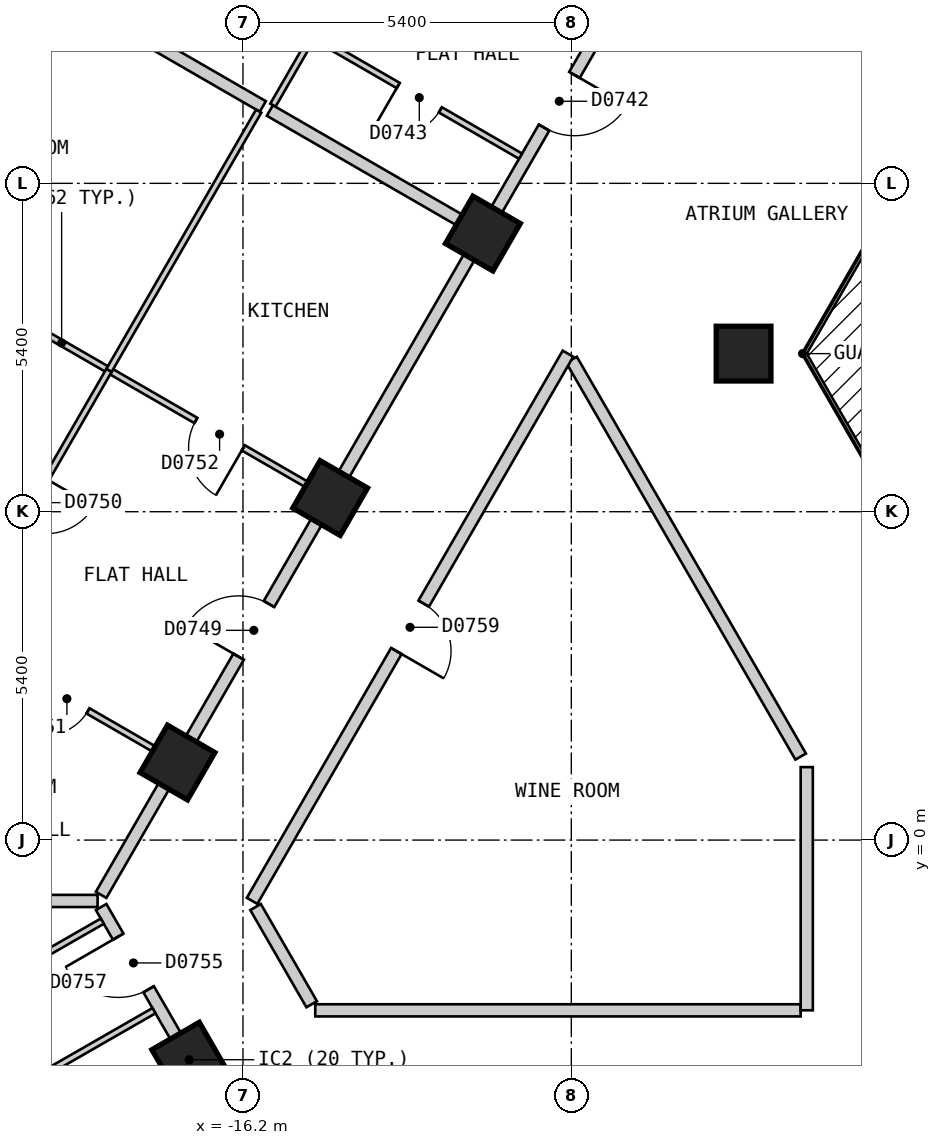
"""IFC4 building model, lengths in metres.
Left out: names, types, materials, properties, quantities, classifications, styles, units other than length and angle.
Written with IfcOpenShell. Run it as: python <this file> out.ifc"""

import sys

from ifc_helpers import new_model, si_unit, direction, frame, frame_2d, origin, origin_2d, place, context, subcontext, project, spatial, polyline, rectangle, outline, extrude, element, fill, save


model = new_model("IFC4")
c1 = context("Model", 3, precision=1e-05, world=origin(), true_north=direction((0.0, 1.0)))
c2 = subcontext(c1, "Body", "Model", "MODEL_VIEW")
j1 = project(units=[si_unit("LENGTHUNIT", "METRE"), si_unit("PLANEANGLEUNIT", "RADIAN")], contexts=[c1])
p1 = place(None, origin())
s1 = spatial("IfcSite", under=j1, at=p1, CompositionType="ELEMENT")
p2 = place(p1, origin())
s2 = spatial("IfcBuilding", under=s1, at=p2, CompositionType="ELEMENT")
p3 = place(p2, frame((0.0, 0.0, 93.0)))
s3 = spatial("IfcBuildingStorey", under=s2, at=p3, CompositionType="ELEMENT", Elevation=93.0)
for number, where, z_axis, x_axis in (
    (1, (-17.083, -3.612, 0.0), (0.0, 0.0, 1.0), (0.5, -0.866, 0.0)),
    (2, (-7.967, 8.0, 0.0), (0.0, 0.0, 1.0), (1.0, 0.0, 0.0)),
    (3, (-12.254, 9.975, 0.0), (0.0, 0.0, 1.0), (-0.5, -0.866, 0.0)),
    (4, (-14.766, 5.625, 0.0), (0.0, 0.0, 1.0), (-0.5, -0.866, 0.0)),
    (5, (-17.277, 1.275, 0.0), (0.0, 0.0, 1.0), (-0.5, -0.866, 0.0)),
):
    element("IfcColumn", number, at=place(p3, frame(where, z_axis=z_axis, x_axis=x_axis)), inside=s3, PredefinedType="COLUMN", context=c2, shape_type="SweptSolid", body=[
        extrude(rectangle(XDim=0.9, YDim=0.9, at=origin_2d()), origin(), (0.0, 0.0, 1.0), 3.0),
    ])
p4 = place(p3, frame((-15.747, 24.425, 0.0), z_axis=(0.0, 0.0, 1.0), x_axis=(-0.500027479704, -0.866009537788, 0.0)))
e6 = element("IfcWall", 6, at=p4, inside=s3, PredefinedType="SOLIDWALL", context=c2, shape_type="SweptSolid", body=[
    extrude(outline(polyline([(0.0, -0.15), (26.559, -0.15), (26.478, 0.15), (0.08, 0.15), (0.0, -0.15)])), origin(), (0.0, 0.0, 1.0), 2.7),
])
p5 = place(p4, frame((1.227, 0.0, 0.15)))
e7 = element("IfcOpeningElement", 7, at=p5, cuts=e6, PredefinedType="OPENING", context=c2, shape_type="SweptSolid", body=[
    extrude(rectangle(XDim=1.5, YDim=2.1, at=frame_2d((0.75, 1.05))), frame((0.0, 0.16, 0.0), z_axis=(0.0, -1.0, 0.0), x_axis=(1.0, 0.0, 0.0)), (0.0, 0.0, 1.0), 0.32),
])
p6 = place(p4, frame((3.739, 0.0, 0.15)))
e8 = element("IfcOpeningElement", 8, at=p6, cuts=e6, PredefinedType="OPENING", context=c2, shape_type="SweptSolid", body=[
    extrude(rectangle(XDim=1.5, YDim=2.1, at=frame_2d((0.75, 1.05))), frame((0.0, 0.16, 0.0), z_axis=(0.0, -1.0, 0.0), x_axis=(1.0, 0.0, 0.0)), (0.0, 0.0, 1.0), 0.32),
])
p7 = place(p4, frame((6.25, 0.0, 0.15)))
e9 = element("IfcOpeningElement", 9, at=p7, cuts=e6, PredefinedType="OPENING", context=c2, shape_type="SweptSolid", body=[
    extrude(rectangle(XDim=1.5, YDim=2.1, at=frame_2d((0.75, 1.05))), frame((0.0, 0.16, 0.0), z_axis=(0.0, -1.0, 0.0), x_axis=(1.0, 0.0, 0.0)), (0.0, 0.0, 1.0), 0.32),
])
p8 = place(p4, frame((8.761, 0.0, 0.15)))
e10 = element("IfcOpeningElement", 10, at=p8, cuts=e6, PredefinedType="OPENING", context=c2, shape_type="SweptSolid", body=[
    extrude(rectangle(XDim=1.5, YDim=2.1, at=frame_2d((0.75, 1.05))), frame((0.0, 0.16, 0.0), z_axis=(0.0, -1.0, 0.0), x_axis=(1.0, 0.0, 0.0)), (0.0, 0.0, 1.0), 0.32),
])
p9 = place(p4, frame((11.273, 0.0, 0.15)))
e11 = element("IfcOpeningElement", 11, at=p9, cuts=e6, PredefinedType="OPENING", context=c2, shape_type="SweptSolid", body=[
    extrude(rectangle(XDim=1.5, YDim=2.1, at=frame_2d((0.75, 1.05))), frame((0.0, 0.16, 0.0), z_axis=(0.0, -1.0, 0.0), x_axis=(1.0, 0.0, 0.0)), (0.0, 0.0, 1.0), 0.32),
])
p10 = place(p4, frame((13.785, 0.0, 0.15)))
e12 = element("IfcOpeningElement", 12, at=p10, cuts=e6, PredefinedType="OPENING", context=c2, shape_type="SweptSolid", body=[
    extrude(rectangle(XDim=1.5, YDim=2.1, at=frame_2d((0.75, 1.05))), frame((0.0, 0.16, 0.0), z_axis=(0.0, -1.0, 0.0), x_axis=(1.0, 0.0, 0.0)), (0.0, 0.0, 1.0), 0.32),
])
p11 = place(p4, frame((16.296, 0.0, 0.15)))
e13 = element("IfcOpeningElement", 13, at=p11, cuts=e6, PredefinedType="OPENING", context=c2, shape_type="SweptSolid", body=[
    extrude(rectangle(XDim=1.5, YDim=2.1, at=frame_2d((0.75, 1.05))), frame((0.0, 0.16, 0.0), z_axis=(0.0, -1.0, 0.0), x_axis=(1.0, 0.0, 0.0)), (0.0, 0.0, 1.0), 0.32),
])
p12 = place(p4, frame((18.807, 0.0, 0.15)))
e14 = element("IfcOpeningElement", 14, at=p12, cuts=e6, PredefinedType="OPENING", context=c2, shape_type="SweptSolid", body=[
    extrude(rectangle(XDim=1.5, YDim=2.1, at=frame_2d((0.75, 1.05))), frame((0.0, 0.16, 0.0), z_axis=(0.0, -1.0, 0.0), x_axis=(1.0, 0.0, 0.0)), (0.0, 0.0, 1.0), 0.32),
])
p13 = place(p4, frame((21.319, 0.0, 0.15)))
e15 = element("IfcOpeningElement", 15, at=p13, cuts=e6, PredefinedType="OPENING", context=c2, shape_type="SweptSolid", body=[
    extrude(rectangle(XDim=1.5, YDim=2.1, at=frame_2d((0.75, 1.05))), frame((0.0, 0.16, 0.0), z_axis=(0.0, -1.0, 0.0), x_axis=(1.0, 0.0, 0.0)), (0.0, 0.0, 1.0), 0.32),
])
p14 = place(p4, frame((23.831, 0.0, 0.15)))
e16 = element("IfcOpeningElement", 16, at=p14, cuts=e6, PredefinedType="OPENING", context=c2, shape_type="SweptSolid", body=[
    extrude(rectangle(XDim=1.5, YDim=2.1, at=frame_2d((0.75, 1.05))), frame((0.0, 0.16, 0.0), z_axis=(0.0, -1.0, 0.0), x_axis=(1.0, 0.0, 0.0)), (0.0, 0.0, 1.0), 0.32),
])
p15 = place(p3, frame((-29.027, -3.425, 0.0), z_axis=(0.0, 0.0, 1.0), x_axis=(0.500035407905, -0.866004960056, 0.0)))
e17 = element("IfcWall", 17, at=p15, inside=s3, PredefinedType="SOLIDWALL", context=c2, shape_type="SweptSolid", body=[
    extrude(outline(polyline([(0.0, -0.15), (23.094, -0.15), (23.014, 0.15), (0.08, 0.15), (0.0, -0.15)])), origin(), (0.0, 0.0, 1.0), 2.7),
])
p16 = place(p15, frame((1.324, 0.0, 0.15)))
e18 = element("IfcOpeningElement", 18, at=p16, cuts=e17, PredefinedType="OPENING", context=c2, shape_type="SweptSolid", body=[
    extrude(rectangle(XDim=1.5, YDim=2.1, at=frame_2d((0.75, 1.05))), frame((0.0, 0.16, 0.0), z_axis=(0.0, -1.0, 0.0), x_axis=(1.0, 0.0, 0.0)), (0.0, 0.0, 1.0), 0.32),
])
p17 = place(p15, frame((4.031, 0.0, 0.15)))
e19 = element("IfcOpeningElement", 19, at=p17, cuts=e17, PredefinedType="OPENING", context=c2, shape_type="SweptSolid", body=[
    extrude(rectangle(XDim=1.5, YDim=2.1, at=frame_2d((0.75, 1.05))), frame((0.0, 0.16, 0.0), z_axis=(0.0, -1.0, 0.0), x_axis=(1.0, 0.0, 0.0)), (0.0, 0.0, 1.0), 0.32),
])
p18 = place(p15, frame((6.737, 0.0, 0.15)))
e20 = element("IfcOpeningElement", 20, at=p18, cuts=e17, PredefinedType="OPENING", context=c2, shape_type="SweptSolid", body=[
    extrude(rectangle(XDim=1.5, YDim=2.1, at=frame_2d((0.75, 1.05))), frame((0.0, 0.16, 0.0), z_axis=(0.0, -1.0, 0.0), x_axis=(1.0, 0.0, 0.0)), (0.0, 0.0, 1.0), 0.32),
])
p19 = place(p15, frame((9.444, 0.0, 0.15)))
e21 = element("IfcOpeningElement", 21, at=p19, cuts=e17, PredefinedType="OPENING", context=c2, shape_type="SweptSolid", body=[
    extrude(rectangle(XDim=1.5, YDim=2.1, at=frame_2d((0.75, 1.05))), frame((0.0, 0.16, 0.0), z_axis=(0.0, -1.0, 0.0), x_axis=(1.0, 0.0, 0.0)), (0.0, 0.0, 1.0), 0.32),
])
p20 = place(p15, frame((12.151, 0.0, 0.15)))
e22 = element("IfcOpeningElement", 22, at=p20, cuts=e17, PredefinedType="OPENING", context=c2, shape_type="SweptSolid", body=[
    extrude(rectangle(XDim=1.5, YDim=2.1, at=frame_2d((0.75, 1.05))), frame((0.0, 0.16, 0.0), z_axis=(0.0, -1.0, 0.0), x_axis=(1.0, 0.0, 0.0)), (0.0, 0.0, 1.0), 0.32),
])
p21 = place(p15, frame((14.857, 0.0, 0.15)))
e23 = element("IfcOpeningElement", 23, at=p21, cuts=e17, PredefinedType="OPENING", context=c2, shape_type="SweptSolid", body=[
    extrude(rectangle(XDim=1.5, YDim=2.1, at=frame_2d((0.75, 1.05))), frame((0.0, 0.16, 0.0), z_axis=(0.0, -1.0, 0.0), x_axis=(1.0, 0.0, 0.0)), (0.0, 0.0, 1.0), 0.32),
])
p22 = place(p15, frame((17.564, 0.0, 0.15)))
e24 = element("IfcOpeningElement", 24, at=p22, cuts=e17, PredefinedType="OPENING", context=c2, shape_type="SweptSolid", body=[
    extrude(rectangle(XDim=1.5, YDim=2.1, at=frame_2d((0.75, 1.05))), frame((0.0, 0.16, 0.0), z_axis=(0.0, -1.0, 0.0), x_axis=(1.0, 0.0, 0.0)), (0.0, 0.0, 1.0), 0.32),
])
p23 = place(p15, frame((20.27, 0.0, 0.15)))
e25 = element("IfcOpeningElement", 25, at=p23, cuts=e17, PredefinedType="OPENING", context=c2, shape_type="SweptSolid", body=[
    extrude(rectangle(XDim=1.5, YDim=2.1, at=frame_2d((0.75, 1.05))), frame((0.0, 0.16, 0.0), z_axis=(0.0, -1.0, 0.0), x_axis=(1.0, 0.0, 0.0)), (0.0, 0.0, 1.0), 0.32),
])
p24 = place(p3, frame((-10.796, 7.899, 0.0), z_axis=(0.0, 0.0, 1.0), x_axis=(0.500010383074, -0.866019409031, 0.0)))
e26 = element("IfcWall", 26, at=p24, inside=s3, PredefinedType="PARTITIONING", context=c2, shape_type="SweptSolid", body=[
    extrude(rectangle(XDim=7.535, YDim=0.2, at=frame_2d((3.768, 0.0))), origin(), (0.0, 0.0, 1.0), 2.7),
])
p25 = place(p3, frame((-15.993, -1.101, 0.0), z_axis=(0.0, 0.0, 1.0), x_axis=(0.499894174133, -0.866086493757, 0.0)))
e27 = element("IfcWall", 27, at=p25, inside=s3, PredefinedType="PARTITIONING", context=c2, shape_type="SweptSolid", body=[
    extrude(rectangle(XDim=1.846, YDim=0.2, at=frame_2d((0.923, 0.0))), origin(), (0.0, 0.0, 1.0), 2.7),
])
p26 = place(p3, frame((-18.533, -1.101, 0.0), z_axis=(0.0, 0.0, 1.0), x_axis=(0.500135180047, -0.865947343479, 0.0)))
e28 = element("IfcWall", 28, at=p26, inside=s3, PredefinedType="PARTITIONING", context=c2, shape_type="SweptSolid", body=[
    extrude(rectangle(XDim=2.799, YDim=0.2, at=frame_2d((1.399, 0.0))), origin(), (0.0, 0.0, 1.0), 2.7),
])
p27 = place(p26, frame((0.562, 0.0, 0.0)))
e29 = element("IfcOpeningElement", 29, at=p27, cuts=e28, PredefinedType="OPENING", context=c2, shape_type="SweptSolid", body=[
    extrude(rectangle(XDim=1.0, YDim=2.1, at=frame_2d((0.5, 1.05))), frame((0.0, 0.11, 0.0), z_axis=(0.0, -1.0, 0.0), x_axis=(1.0, 0.0, 0.0)), (0.0, 0.0, 1.0), 0.22),
])
p28 = place(p3, frame((-15.011, -2.8, 0.0), z_axis=(0.0, 0.0, 1.0), x_axis=(1.0, 0.0, 0.0)))
e30 = element("IfcWall", 30, at=p28, inside=s3, PredefinedType="PARTITIONING", context=c2, shape_type="SweptSolid", body=[
    extrude(rectangle(XDim=7.982, YDim=0.2, at=frame_2d((3.991, 0.0))), origin(), (0.0, 0.0, 1.0), 2.7),
])
p29 = place(p3, frame((-16.05, -1.0, 0.0), z_axis=(0.0, 0.0, 1.0), x_axis=(0.499962449088, 0.866047082728, 0.0)))
e31 = element("IfcWall", 31, at=p29, inside=s3, PredefinedType="PARTITIONING", context=c2, shape_type="SweptSolid", body=[
    extrude(rectangle(XDim=10.391, YDim=0.2, at=frame_2d((5.195, 0.0))), origin(), (0.0, 0.0, 1.0), 2.7),
])
p30 = place(p29, frame((4.745, 0.0, 0.0)))
e32 = element("IfcOpeningElement", 32, at=p30, cuts=e31, PredefinedType="OPENING", context=c2, shape_type="SweptSolid", body=[
    extrude(rectangle(XDim=0.9, YDim=2.1, at=frame_2d((0.45, 1.05))), frame((0.0, 0.11, 0.0), z_axis=(0.0, -1.0, 0.0), x_axis=(1.0, 0.0, 0.0)), (0.0, 0.0, 1.0), 0.22),
])
p31 = place(p3, frame((-18.533, -0.901, 0.0), z_axis=(0.0, 0.0, 1.0), x_axis=(0.499981198768, 0.866036258409, 0.0)))
e33 = element("IfcWall", 33, at=p31, inside=s3, PredefinedType="PARTITIONING", context=c2, shape_type="SweptSolid", body=[
    extrude(rectangle(XDim=20.093, YDim=0.2, at=frame_2d((10.046, 0.0))), origin(), (0.0, 0.0, 1.0), 2.7),
])
p32 = place(p31, frame((14.57, 0.0, 0.0)))
e34 = element("IfcOpeningElement", 34, at=p32, cuts=e33, PredefinedType="OPENING", context=c2, shape_type="SweptSolid", body=[
    extrude(rectangle(XDim=1.0, YDim=2.1, at=frame_2d((0.5, 1.05))), frame((0.0, 0.11, 0.0), z_axis=(0.0, -1.0, 0.0), x_axis=(1.0, 0.0, 0.0)), (0.0, 0.0, 1.0), 0.22),
])
p33 = place(p31, frame((4.523, 0.0, 0.0)))
e35 = element("IfcOpeningElement", 35, at=p33, cuts=e33, PredefinedType="OPENING", context=c2, shape_type="SweptSolid", body=[
    extrude(rectangle(XDim=1.0, YDim=2.1, at=frame_2d((0.5, 1.05))), frame((0.0, 0.11, 0.0), z_axis=(0.0, -1.0, 0.0), x_axis=(1.0, 0.0, 0.0)), (0.0, 0.0, 1.0), 0.22),
])
p34 = place(p3, frame((-6.928, -2.799, 0.0), z_axis=(0.0, 0.0, 1.0), x_axis=(0.0, 1.0, 0.0)))
e36 = element("IfcWall", 36, at=p34, inside=s3, PredefinedType="PARTITIONING", context=c2, shape_type="SweptSolid", body=[
    extrude(rectangle(XDim=3.999, YDim=0.2, at=frame_2d((2.0, 0.0))), origin(), (0.0, 0.0, 1.0), 2.7),
])
p35 = place(p3, frame((-26.025, 6.325, 0.0), z_axis=(0.0, 0.0, 1.0), x_axis=(0.866041268327, -0.499972520799, 0.0)))
e37 = element("IfcWall", 37, at=p35, inside=s3, PredefinedType="PARTITIONING", context=c2, shape_type="SweptSolid", body=[
    extrude(rectangle(XDim=10.0, YDim=0.1, at=frame_2d((5.0, 0.0))), origin(), (0.0, 0.0, 1.0), 2.7),
])
p36 = place(p35, frame((7.601, 0.0, 0.0)))
e38 = element("IfcOpeningElement", 38, at=p36, cuts=e37, PredefinedType="OPENING", context=c2, shape_type="SweptSolid", body=[
    extrude(rectangle(XDim=0.8, YDim=2.1, at=frame_2d((0.4, 1.05))), frame((0.0, 0.06, 0.0), z_axis=(0.0, -1.0, 0.0), x_axis=(1.0, 0.0, 0.0)), (0.0, 0.0, 1.0), 0.12),
])
p37 = place(p35, frame((2.5, 0.0, 0.0)))
e39 = element("IfcOpeningElement", 39, at=p37, cuts=e37, PredefinedType="OPENING", context=c2, shape_type="SweptSolid", body=[
    extrude(rectangle(XDim=0.9, YDim=2.1, at=frame_2d((0.45, 1.05))), frame((0.0, 0.06, 0.0), z_axis=(0.0, -1.0, 0.0), x_axis=(1.0, 0.0, 0.0)), (0.0, 0.0, 1.0), 0.12),
])
p38 = place(p3, frame((-23.513, 10.675, 0.0), z_axis=(0.0, 0.0, 1.0), x_axis=(0.866041268327, -0.499972520799, 0.0)))
e40 = element("IfcWall", 40, at=p38, inside=s3, PredefinedType="PARTITIONING", context=c2, shape_type="SweptSolid", body=[
    extrude(rectangle(XDim=10.0, YDim=0.1, at=frame_2d((5.0, 0.0))), origin(), (0.0, 0.0, 1.0), 2.7),
])
p39 = place(p38, frame((7.55, 0.0, 0.0)))
e41 = element("IfcOpeningElement", 41, at=p39, cuts=e40, PredefinedType="OPENING", context=c2, shape_type="SweptSolid", body=[
    extrude(rectangle(XDim=0.9, YDim=2.1, at=frame_2d((0.45, 1.05))), frame((0.0, 0.06, 0.0), z_axis=(0.0, -1.0, 0.0), x_axis=(1.0, 0.0, 0.0)), (0.0, 0.0, 1.0), 0.12),
])
p40 = place(p38, frame((2.5, 0.0, 0.0)))
e42 = element("IfcOpeningElement", 42, at=p40, cuts=e40, PredefinedType="OPENING", context=c2, shape_type="SweptSolid", body=[
    extrude(rectangle(XDim=0.9, YDim=2.1, at=frame_2d((0.45, 1.05))), frame((0.0, 0.06, 0.0), z_axis=(0.0, -1.0, 0.0), x_axis=(1.0, 0.0, 0.0)), (0.0, 0.0, 1.0), 0.12),
])
p41 = place(p3, frame((-15.009, 13.196, 0.0), z_axis=(0.0, 0.0, 1.0), x_axis=(0.865916335424, -0.500188864377, 0.0)))
e43 = element("IfcWall", 43, at=p41, inside=s3, PredefinedType="PARTITIONING", context=c2, shape_type="SweptSolid", body=[
    extrude(rectangle(XDim=3.896, YDim=0.1, at=frame_2d((1.948, 0.0))), origin(), (0.0, 0.0, 1.0), 2.7),
])
p42 = place(p41, frame((1.573, 0.0, 0.0)))
e44 = element("IfcOpeningElement", 44, at=p42, cuts=e43, PredefinedType="OPENING", context=c2, shape_type="SweptSolid", body=[
    extrude(rectangle(XDim=0.8, YDim=2.1, at=frame_2d((0.4, 1.05))), frame((0.0, 0.06, 0.0), z_axis=(0.0, -1.0, 0.0), x_axis=(1.0, 0.0, 0.0)), (0.0, 0.0, 1.0), 0.12),
])
p43 = place(p3, frame((-15.708, 12.085, 0.0), z_axis=(0.0, 0.0, 1.0), x_axis=(0.499943653708, 0.866057932887, 0.0)))
e45 = element("IfcWall", 45, at=p43, inside=s3, PredefinedType="PARTITIONING", context=c2, shape_type="SweptSolid", body=[
    extrude(rectangle(XDim=4.873, YDim=0.1, at=frame_2d((2.436, 0.0))), origin(), (0.0, 0.0, 1.0), 2.7),
])
p44 = place(p43, frame((1.962, 0.0, 0.0)))
e46 = element("IfcOpeningElement", 46, at=p44, cuts=e45, PredefinedType="OPENING", context=c2, shape_type="SweptSolid", body=[
    extrude(rectangle(XDim=0.9, YDim=2.1, at=frame_2d((0.45, 1.05))), frame((0.0, 0.06, 0.0), z_axis=(0.0, -1.0, 0.0), x_axis=(1.0, 0.0, 0.0)), (0.0, 0.0, 1.0), 0.12),
])
p45 = place(p3, frame((-20.89, 3.418, 0.0), z_axis=(0.0, 0.0, 1.0), x_axis=(0.500014231302, 0.866017187182, 0.0)))
e47 = element("IfcWall", 47, at=p45, inside=s3, PredefinedType="PARTITIONING", context=c2, shape_type="SweptSolid", body=[
    extrude(rectangle(XDim=4.973, YDim=0.1, at=frame_2d((2.487, 0.0))), origin(), (0.0, 0.0, 1.0), 2.7),
])
p46 = place(p45, frame((2.011, 0.0, 0.0)))
e48 = element("IfcOpeningElement", 48, at=p46, cuts=e47, PredefinedType="OPENING", context=c2, shape_type="SweptSolid", body=[
    extrude(rectangle(XDim=0.9, YDim=2.1, at=frame_2d((0.45, 1.05))), frame((0.0, 0.06, 0.0), z_axis=(0.0, -1.0, 0.0), x_axis=(1.0, 0.0, 0.0)), (0.0, 0.0, 1.0), 0.12),
])
p47 = place(p3, frame((-22.245, -5.435, 0.0), z_axis=(0.0, 0.0, 1.0), x_axis=(0.867311485465, 0.497765795511, 0.0)))
e49 = element("IfcWall", 49, at=p47, inside=s3, PredefinedType="PARTITIONING", context=c2, shape_type="SweptSolid", body=[
    extrude(rectangle(XDim=5.282, YDim=0.1, at=frame_2d((2.641, 0.0))), origin(), (0.0, 0.0, 1.0), 2.7),
])
p48 = place(p47, frame((2.291, 0.0, 0.0)))
e50 = element("IfcOpeningElement", 50, at=p48, cuts=e49, PredefinedType="OPENING", context=c2, shape_type="SweptSolid", body=[
    extrude(rectangle(XDim=0.8, YDim=2.1, at=frame_2d((0.4, 1.05))), frame((0.0, 0.06, 0.0), z_axis=(0.0, -1.0, 0.0), x_axis=(1.0, 0.0, 0.0)), (0.0, 0.0, 1.0), 0.12),
])
p49 = place(p3, frame((-22.094, -3.388, 0.0), z_axis=(0.0, 0.0, 1.0), x_axis=(0.867386440944, 0.497635169644, 0.0)))
e51 = element("IfcWall", 51, at=p49, inside=s3, PredefinedType="PARTITIONING", context=c2, shape_type="SweptSolid", body=[
    extrude(rectangle(XDim=4.127, YDim=0.1, at=frame_2d((2.064, 0.0))), origin(), (0.0, 0.0, 1.0), 2.7),
])
p50 = place(p49, frame((1.634, 0.0, 0.0)))
e52 = element("IfcOpeningElement", 52, at=p50, cuts=e51, PredefinedType="OPENING", context=c2, shape_type="SweptSolid", body=[
    extrude(rectangle(XDim=0.9, YDim=2.1, at=frame_2d((0.45, 1.05))), frame((0.0, 0.06, 0.0), z_axis=(0.0, -1.0, 0.0), x_axis=(1.0, 0.0, 0.0)), (0.0, 0.0, 1.0), 0.12),
])
p51 = place(p3, frame((-21.001, 15.025, 0.0), z_axis=(0.0, 0.0, 1.0), x_axis=(0.866031754707, -0.499988999718, 0.0)))
e53 = element("IfcWall", 53, at=p51, inside=s3, PredefinedType="PARTITIONING", context=c2, shape_type="SweptSolid", body=[
    extrude(rectangle(XDim=5.92, YDim=0.2, at=frame_2d((2.96, 0.0))), origin(), (0.0, 0.0, 1.0), 2.7),
])
p52 = place(p3, frame((-15.758, 11.998, 0.0), z_axis=(0.0, 0.0, 1.0), x_axis=(0.865987741337, -0.5000652276, 0.0)))
e54 = element("IfcWall", 54, at=p52, inside=s3, PredefinedType="PARTITIONING", context=c2, shape_type="SweptSolid", body=[
    extrude(rectangle(XDim=3.946, YDim=0.2, at=frame_2d((1.973, 0.0))), origin(), (0.0, 0.0, 1.0), 2.7),
])
p53 = place(p3, frame((-23.164, -1.001, 0.0), z_axis=(0.0, 0.0, 1.0), x_axis=(1.0, 0.0, 0.0)))
e55 = element("IfcWall", 55, at=p53, inside=s3, PredefinedType="PARTITIONING", context=c2, shape_type="SweptSolid", body=[
    extrude(rectangle(XDim=4.573, YDim=0.2, at=frame_2d((2.287, 0.0))), origin(), (0.0, 0.0, 1.0), 2.7),
])
p54 = place(p3, frame((-17.385, -3.786, 0.0), z_axis=(0.0, 0.0, 1.0), x_axis=(0.86668269741, 0.498859801958, 0.0)))
e56 = element("IfcWall", 56, at=p54, inside=s3, PredefinedType="PARTITIONING", context=c2, shape_type="SweptSolid", body=[
    extrude(rectangle(XDim=0.319, YDim=0.2, at=frame_2d((0.159, 0.0))), origin(), (0.0, 0.0, 1.0), 2.7),
])
p55 = place(p3, frame((-18.403, 7.725, 0.0), z_axis=(0.0, 0.0, 1.0), x_axis=(0.499995794706, 0.866027831699, 0.0)))
e57 = element("IfcWall", 57, at=p55, inside=s3, PredefinedType="PARTITIONING", context=c2, shape_type="SweptSolid", body=[
    extrude(rectangle(XDim=4.922, YDim=0.1, at=frame_2d((2.461, 0.0))), origin(), (0.0, 0.0, 1.0), 2.7),
])
p56 = place(p32, origin())
e58 = element("IfcDoor", 58, at=p56, inside=s3, OperationType="SINGLE_SWING_RIGHT", PredefinedType="DOOR", context=c2, shape_type="SweptSolid", body=[
    extrude(rectangle(XDim=1.0, YDim=2.1, at=frame_2d((0.5, 1.05))), frame((0.0, 0.025, 0.0), z_axis=(0.0, -1.0, 0.0), x_axis=(1.0, 0.0, 0.0)), (0.0, 0.0, 1.0), 0.05),
])
fill(e34, e58)
p57 = place(p42, origin())
e59 = element("IfcDoor", 59, at=p57, inside=s3, OperationType="SINGLE_SWING_LEFT", PredefinedType="DOOR", context=c2, shape_type="SweptSolid", body=[
    extrude(rectangle(XDim=0.8, YDim=2.1, at=frame_2d((0.4, 1.05))), frame((0.0, 0.025, 0.0), z_axis=(0.0, -1.0, 0.0), x_axis=(1.0, 0.0, 0.0)), (0.0, 0.0, 1.0), 0.05),
])
fill(e44, e59)
p58 = place(p33, origin())
e60 = element("IfcDoor", 60, at=p58, inside=s3, OperationType="SINGLE_SWING_LEFT", PredefinedType="DOOR", context=c2, shape_type="SweptSolid", body=[
    extrude(rectangle(XDim=1.0, YDim=2.1, at=frame_2d((0.5, 1.05))), frame((0.0, 0.025, 0.0), z_axis=(0.0, -1.0, 0.0), x_axis=(1.0, 0.0, 0.0)), (0.0, 0.0, 1.0), 0.05),
])
fill(e35, e60)
p59 = place(p36, origin())
e61 = element("IfcDoor", 61, at=p59, inside=s3, OperationType="SINGLE_SWING_LEFT", PredefinedType="DOOR", context=c2, shape_type="SweptSolid", body=[
    extrude(rectangle(XDim=0.8, YDim=2.1, at=frame_2d((0.4, 1.05))), frame((0.0, 0.025, 0.0), z_axis=(0.0, -1.0, 0.0), x_axis=(1.0, 0.0, 0.0)), (0.0, 0.0, 1.0), 0.05),
])
fill(e38, e61)
p60 = place(p39, origin())
e62 = element("IfcDoor", 62, at=p60, inside=s3, OperationType="SINGLE_SWING_RIGHT", PredefinedType="DOOR", context=c2, shape_type="SweptSolid", body=[
    extrude(rectangle(XDim=0.9, YDim=2.1, at=frame_2d((0.45, 1.05))), frame((0.0, 0.025, 0.0), z_axis=(0.0, -1.0, 0.0), x_axis=(1.0, 0.0, 0.0)), (0.0, 0.0, 1.0), 0.05),
])
fill(e41, e62)
p61 = place(p27, origin())
e63 = element("IfcDoor", 63, at=p61, inside=s3, OperationType="SINGLE_SWING_LEFT", PredefinedType="DOOR", context=c2, shape_type="SweptSolid", body=[
    extrude(rectangle(XDim=1.0, YDim=2.1, at=frame_2d((0.5, 1.05))), frame((0.0, 0.025, 0.0), z_axis=(0.0, -1.0, 0.0), x_axis=(1.0, 0.0, 0.0)), (0.0, 0.0, 1.0), 0.05),
])
fill(e29, e63)
p62 = place(p30, origin())
e64 = element("IfcDoor", 64, at=p62, inside=s3, OperationType="SINGLE_SWING_LEFT", PredefinedType="DOOR", context=c2, shape_type="SweptSolid", body=[
    extrude(rectangle(XDim=0.9, YDim=2.1, at=frame_2d((0.45, 1.05))), frame((0.0, 0.025, 0.0), z_axis=(0.0, -1.0, 0.0), x_axis=(1.0, 0.0, 0.0)), (0.0, 0.0, 1.0), 0.05),
])
fill(e32, e64)
save(model, sys.argv[1])
